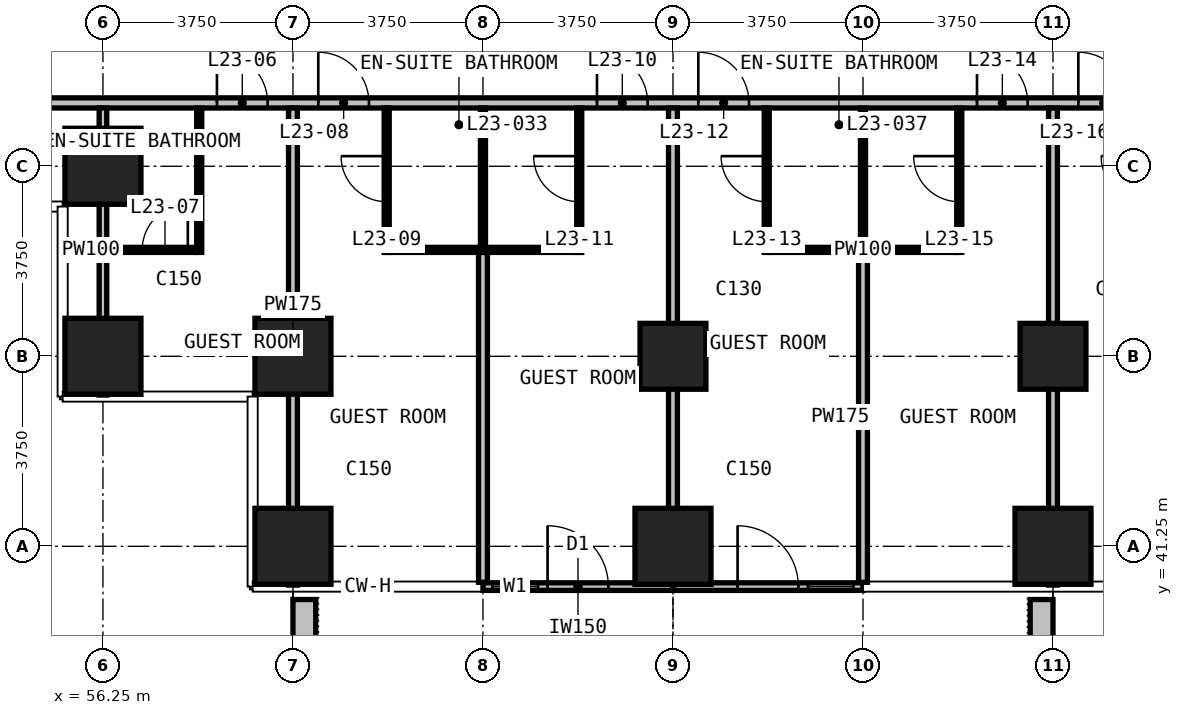
"""IFC4 building model, lengths in metres.
Left out: names, types, materials, properties, quantities, classifications, styles, units other than length and angle.
Written with IfcOpenShell. Run it as: python <this file> out.ifc"""

import sys

from ifc_helpers import new_model, si_unit, direction, frame, frame_2d, origin, origin_2d, place, context, subcontext, project, spatial, rectangle, extrude, element, fill, save


model = new_model("IFC4")
c1 = context("Model", 3, precision=1e-05, world=origin(), true_north=direction((0.0, 1.0)))
c2 = subcontext(c1, "Body", "Model", "MODEL_VIEW")
j1 = project(units=[si_unit("LENGTHUNIT", "METRE"), si_unit("PLANEANGLEUNIT", "RADIAN")], contexts=[c1])
p1 = place(None, origin())
s1 = spatial("IfcSite", under=j1, at=p1, CompositionType="ELEMENT")
p2 = place(p1, origin())
s2 = spatial("IfcBuilding", under=s1, at=p2, CompositionType="ELEMENT")
p3 = place(p2, frame((0.0, 0.0, 95.6)))
s3 = spatial("IfcBuildingStorey", under=s2, at=p3, CompositionType="ELEMENT", Elevation=95.6)
for number, where, z_axis, x_axis in (
    (1, (56.25, 45.0, 0.0), (0.0, 0.0, 1.0), (1.0, 0.0, 0.0)),
    (2, (56.25, 48.75, 0.0), (0.0, 0.0, 1.0), (1.0, 0.0, 0.0)),
    (3, (60.0, 41.25, 0.0), (0.0, 0.0, 1.0), (1.0, 0.0, 0.0)),
    (4, (60.0, 45.0, 0.0), (0.0, 0.0, 1.0), (1.0, 0.0, 0.0)),
    (5, (67.5, 41.25, 0.0), (0.0, 0.0, 1.0), (1.0, 0.0, 0.0)),
):
    element("IfcColumn", number, at=place(p3, frame(where, z_axis=z_axis, x_axis=x_axis)), inside=s3, PredefinedType="COLUMN", context=c2, shape_type="SweptSolid", body=[
        extrude(rectangle(XDim=1.5, YDim=1.5, at=origin_2d()), origin(), (0.0, 0.0, 1.0), 3.3),
    ])
p4 = place(p3, frame((67.5, 45.0, 0.0), z_axis=(0.0, 0.0, 1.0), x_axis=(1.0, 0.0, 0.0)))
e6 = element("IfcColumn", 6, at=p4, inside=s3, PredefinedType="COLUMN", context=c2, shape_type="SweptSolid", body=[
    extrude(rectangle(XDim=1.3, YDim=1.3, at=origin_2d()), origin(), (0.0, 0.0, 1.0), 3.3),
])
p5 = place(p3, frame((75.0, 41.25, 0.0), z_axis=(0.0, 0.0, 1.0), x_axis=(1.0, 0.0, 0.0)))
e7 = element("IfcColumn", 7, at=p5, inside=s3, PredefinedType="COLUMN", context=c2, shape_type="SweptSolid", body=[
    extrude(rectangle(XDim=1.5, YDim=1.5, at=origin_2d()), origin(), (0.0, 0.0, 1.0), 3.3),
])
p6 = place(p3, frame((75.0, 45.0, 0.0), z_axis=(0.0, 0.0, 1.0), x_axis=(1.0, 0.0, 0.0)))
e8 = element("IfcColumn", 8, at=p6, inside=s3, PredefinedType="COLUMN", context=c2, shape_type="SweptSolid", body=[
    extrude(rectangle(XDim=1.3, YDim=1.3, at=origin_2d()), origin(), (0.0, 0.0, 1.0), 3.3),
])
p7 = place(p3, frame((63.75, 40.455, 0.0), z_axis=(0.0, 0.0, 1.0), x_axis=(1.0, 0.0, 0.0)))
e9 = element("IfcWall", 9, at=p7, inside=s3, PredefinedType="SOLIDWALL", context=c2, shape_type="SweptSolid", body=[
    extrude(rectangle(XDim=3.75, YDim=0.15, at=frame_2d((1.875, 0.0))), origin(), (0.0, 0.0, 1.0), 3.0),
])
p8 = place(p7, frame((0.188, 0.0, 0.1)))
e10 = element("IfcOpeningElement", 10, at=p8, cuts=e9, PredefinedType="OPENING", context=c2, shape_type="SweptSolid", body=[
    extrude(rectangle(XDim=0.9, YDim=2.4, at=frame_2d((0.45, 1.2))), frame((0.0, 0.085, 0.0), z_axis=(0.0, -1.0, 0.0), x_axis=(1.0, 0.0, 0.0)), (0.0, 0.0, 1.0), 0.17),
])
p9 = place(p7, frame((1.275, 0.0, 0.0)))
e11 = element("IfcOpeningElement", 11, at=p9, cuts=e9, PredefinedType="OPENING", context=c2, shape_type="SweptSolid", body=[
    extrude(rectangle(XDim=1.2, YDim=2.4, at=frame_2d((0.6, 1.2))), frame((0.0, 0.085, 0.0), z_axis=(0.0, -1.0, 0.0), x_axis=(1.0, 0.0, 0.0)), (0.0, 0.0, 1.0), 0.17),
])
p10 = place(p3, frame((67.5, 40.455, 0.0), z_axis=(0.0, 0.0, 1.0), x_axis=(1.0, 0.0, 0.0)))
e12 = element("IfcWall", 12, at=p10, inside=s3, PredefinedType="SOLIDWALL", context=c2, shape_type="SweptSolid", body=[
    extrude(rectangle(XDim=3.75, YDim=0.15, at=frame_2d((1.875, 0.0))), origin(), (0.0, 0.0, 1.0), 3.0),
])
p11 = place(p10, frame((1.275, 0.0, 0.0)))
e13 = element("IfcOpeningElement", 13, at=p11, cuts=e12, PredefinedType="OPENING", context=c2, shape_type="SweptSolid", body=[
    extrude(rectangle(XDim=1.2, YDim=2.4, at=frame_2d((0.6, 1.2))), frame((0.0, 0.085, 0.0), z_axis=(0.0, -1.0, 0.0), x_axis=(1.0, 0.0, 0.0)), (0.0, 0.0, 1.0), 0.17),
])
p12 = place(p10, frame((2.663, 0.0, 0.1)))
e14 = element("IfcOpeningElement", 14, at=p12, cuts=e12, PredefinedType="OPENING", context=c2, shape_type="SweptSolid", body=[
    extrude(rectangle(XDim=0.9, YDim=2.4, at=frame_2d((0.45, 1.2))), frame((0.0, 0.085, 0.0), z_axis=(0.0, -1.0, 0.0), x_axis=(1.0, 0.0, 0.0)), (0.0, 0.0, 1.0), 0.17),
])
for number, where, z_axis, x_axis in (
    (15, (60.225, 40.2, 0.0), (0.0, 0.0, 1.0), (0.0, -1.0, 0.0)),
    (16, (74.775, 40.2, 0.0), (0.0, 0.0, 1.0), (0.0, -1.0, 0.0)),
):
    element("IfcWall", number, at=place(p3, frame(where, z_axis=z_axis, x_axis=x_axis)), inside=s3, PredefinedType="USERDEFINED", context=c2, shape_type="SweptSolid", body=[
        extrude(rectangle(XDim=2.35, YDim=0.45, at=frame_2d((1.175, 0.0))), origin(), (0.0, 0.0, 1.0), 1.1),
    ])
p13 = place(p3, frame((52.575, 50.0, 0.0), z_axis=(0.0, 0.0, 1.0), x_axis=(1.0, 0.0, 0.0)))
e17 = element("IfcWall", 17, at=p13, inside=s3, PredefinedType="PARTITIONING", context=c2, shape_type="SweptSolid", body=[
    extrude(rectangle(XDim=44.85, YDim=0.2, at=frame_2d((22.425, 0.0))), origin(), (0.0, 0.0, 1.0), 3.0),
])
p14 = place(p13, frame((5.925, 0.0, 0.0)))
e18 = element("IfcOpeningElement", 18, at=p14, cuts=e17, PredefinedType="OPENING", context=c2, shape_type="SweptSolid", body=[
    extrude(rectangle(XDim=1.0, YDim=2.2, at=frame_2d((0.5, 1.1))), frame((0.0, 0.11, 0.0), z_axis=(0.0, -1.0, 0.0), x_axis=(1.0, 0.0, 0.0)), (0.0, 0.0, 1.0), 0.22),
])
p15 = place(p13, frame((7.925, 0.0, 0.0)))
e19 = element("IfcOpeningElement", 19, at=p15, cuts=e17, PredefinedType="OPENING", context=c2, shape_type="SweptSolid", body=[
    extrude(rectangle(XDim=1.0, YDim=2.2, at=frame_2d((0.5, 1.1))), frame((0.0, 0.11, 0.0), z_axis=(0.0, -1.0, 0.0), x_axis=(1.0, 0.0, 0.0)), (0.0, 0.0, 1.0), 0.22),
])
p16 = place(p13, frame((13.425, 0.0, 0.0)))
e20 = element("IfcOpeningElement", 20, at=p16, cuts=e17, PredefinedType="OPENING", context=c2, shape_type="SweptSolid", body=[
    extrude(rectangle(XDim=1.0, YDim=2.2, at=frame_2d((0.5, 1.1))), frame((0.0, 0.11, 0.0), z_axis=(0.0, -1.0, 0.0), x_axis=(1.0, 0.0, 0.0)), (0.0, 0.0, 1.0), 0.22),
])
p17 = place(p13, frame((15.425, 0.0, 0.0)))
e21 = element("IfcOpeningElement", 21, at=p17, cuts=e17, PredefinedType="OPENING", context=c2, shape_type="SweptSolid", body=[
    extrude(rectangle(XDim=1.0, YDim=2.2, at=frame_2d((0.5, 1.1))), frame((0.0, 0.11, 0.0), z_axis=(0.0, -1.0, 0.0), x_axis=(1.0, 0.0, 0.0)), (0.0, 0.0, 1.0), 0.22),
])
p18 = place(p13, frame((20.925, 0.0, 0.0)))
e22 = element("IfcOpeningElement", 22, at=p18, cuts=e17, PredefinedType="OPENING", context=c2, shape_type="SweptSolid", body=[
    extrude(rectangle(XDim=1.0, YDim=2.2, at=frame_2d((0.5, 1.1))), frame((0.0, 0.11, 0.0), z_axis=(0.0, -1.0, 0.0), x_axis=(1.0, 0.0, 0.0)), (0.0, 0.0, 1.0), 0.22),
])
p19 = place(p13, frame((22.925, 0.0, 0.0)))
e23 = element("IfcOpeningElement", 23, at=p19, cuts=e17, PredefinedType="OPENING", context=c2, shape_type="SweptSolid", body=[
    extrude(rectangle(XDim=1.0, YDim=2.2, at=frame_2d((0.5, 1.1))), frame((0.0, 0.11, 0.0), z_axis=(0.0, -1.0, 0.0), x_axis=(1.0, 0.0, 0.0)), (0.0, 0.0, 1.0), 0.22),
])
p20 = place(p13, frame((28.425, 0.0, 0.0)))
e24 = element("IfcOpeningElement", 24, at=p20, cuts=e17, PredefinedType="OPENING", context=c2, shape_type="SweptSolid", body=[
    extrude(rectangle(XDim=1.0, YDim=2.2, at=frame_2d((0.5, 1.1))), frame((0.0, 0.11, 0.0), z_axis=(0.0, -1.0, 0.0), x_axis=(1.0, 0.0, 0.0)), (0.0, 0.0, 1.0), 0.22),
])
p21 = place(p13, frame((30.425, 0.0, 0.0)))
e25 = element("IfcOpeningElement", 25, at=p21, cuts=e17, PredefinedType="OPENING", context=c2, shape_type="SweptSolid", body=[
    extrude(rectangle(XDim=1.0, YDim=2.2, at=frame_2d((0.5, 1.1))), frame((0.0, 0.11, 0.0), z_axis=(0.0, -1.0, 0.0), x_axis=(1.0, 0.0, 0.0)), (0.0, 0.0, 1.0), 0.22),
])
p22 = place(p13, frame((35.925, 0.0, 0.0)))
e26 = element("IfcOpeningElement", 26, at=p22, cuts=e17, PredefinedType="OPENING", context=c2, shape_type="SweptSolid", body=[
    extrude(rectangle(XDim=1.0, YDim=2.2, at=frame_2d((0.5, 1.1))), frame((0.0, 0.11, 0.0), z_axis=(0.0, -1.0, 0.0), x_axis=(1.0, 0.0, 0.0)), (0.0, 0.0, 1.0), 0.22),
])
p23 = place(p13, frame((37.925, 0.0, 0.0)))
e27 = element("IfcOpeningElement", 27, at=p23, cuts=e17, PredefinedType="OPENING", context=c2, shape_type="SweptSolid", body=[
    extrude(rectangle(XDim=1.0, YDim=2.2, at=frame_2d((0.5, 1.1))), frame((0.0, 0.11, 0.0), z_axis=(0.0, -1.0, 0.0), x_axis=(1.0, 0.0, 0.0)), (0.0, 0.0, 1.0), 0.22),
])
p24 = place(p13, frame((1.4, 0.0, 0.0)))
e28 = element("IfcOpeningElement", 28, at=p24, cuts=e17, PredefinedType="OPENING", context=c2, shape_type="SweptSolid", body=[
    extrude(rectangle(XDim=0.9, YDim=2.2, at=frame_2d((0.45, 1.1))), frame((0.0, 0.11, 0.0), z_axis=(0.0, -1.0, 0.0), x_axis=(1.0, 0.0, 0.0)), (0.0, 0.0, 1.0), 0.22),
])
p25 = place(p13, frame((42.575, 0.0, 0.0)))
e29 = element("IfcOpeningElement", 29, at=p25, cuts=e17, PredefinedType="OPENING", context=c2, shape_type="SweptSolid", body=[
    extrude(rectangle(XDim=0.9, YDim=2.2, at=frame_2d((0.45, 1.1))), frame((0.0, 0.11, 0.0), z_axis=(0.0, -1.0, 0.0), x_axis=(1.0, 0.0, 0.0)), (0.0, 0.0, 1.0), 0.22),
])
p26 = place(p3, frame((60.0, 40.485, 0.0), z_axis=(0.0, 0.0, 1.0), x_axis=(0.0, 1.0, 0.0)))
e30 = element("IfcWall", 30, at=p26, inside=s3, PredefinedType="PARTITIONING", context=c2, shape_type="SweptSolid", body=[
    extrude(rectangle(XDim=9.415, YDim=0.175, at=frame_2d((4.708, 0.0))), origin(), (0.0, 0.0, 1.0), 3.0),
])
p27 = place(p3, frame((63.75, 40.54, 0.0), z_axis=(0.0, 0.0, 1.0), x_axis=(0.0, 1.0, 0.0)))
e31 = element("IfcWall", 31, at=p27, inside=s3, PredefinedType="PARTITIONING", context=c2, shape_type="SweptSolid", body=[
    extrude(rectangle(XDim=6.51, YDim=0.175, at=frame_2d((3.255, 0.0))), origin(), (0.0, 0.0, 1.0), 3.0),
])
p28 = place(p3, frame((67.5, 40.54, 0.0), z_axis=(0.0, 0.0, 1.0), x_axis=(0.0, 1.0, 0.0)))
e32 = element("IfcWall", 32, at=p28, inside=s3, PredefinedType="PARTITIONING", context=c2, shape_type="SweptSolid", body=[
    extrude(rectangle(XDim=9.36, YDim=0.175, at=frame_2d((4.68, 0.0))), origin(), (0.0, 0.0, 1.0), 3.0),
])
p29 = place(p3, frame((71.25, 40.54, 0.0), z_axis=(0.0, 0.0, 1.0), x_axis=(0.0, 1.0, 0.0)))
e33 = element("IfcWall", 33, at=p29, inside=s3, PredefinedType="PARTITIONING", context=c2, shape_type="SweptSolid", body=[
    extrude(rectangle(XDim=6.51, YDim=0.175, at=frame_2d((3.255, 0.0))), origin(), (0.0, 0.0, 1.0), 3.0),
])
p30 = place(p3, frame((75.0, 40.485, 0.0), z_axis=(0.0, 0.0, 1.0), x_axis=(0.0, 1.0, 0.0)))
e34 = element("IfcWall", 34, at=p30, inside=s3, PredefinedType="PARTITIONING", context=c2, shape_type="SweptSolid", body=[
    extrude(rectangle(XDim=9.415, YDim=0.175, at=frame_2d((4.708, 0.0))), origin(), (0.0, 0.0, 1.0), 3.0),
])
p31 = place(p3, frame((56.25, 44.235, 0.0), z_axis=(0.0, 0.0, 1.0), x_axis=(0.0, 1.0, 0.0)))
e35 = element("IfcWall", 35, at=p31, inside=s3, PredefinedType="PARTITIONING", context=c2, shape_type="SweptSolid", body=[
    extrude(rectangle(XDim=5.665, YDim=0.15, at=frame_2d((2.833, 0.0))), origin(), (0.0, 0.0, 1.0), 3.0),
])
p32 = place(p3, frame((56.325, 47.1, 0.0), z_axis=(0.0, 0.0, 1.0), x_axis=(1.0, 0.0, 0.0)))
e36 = element("IfcWall", 36, at=p32, inside=s3, PredefinedType="PARTITIONING", context=c2, shape_type="SweptSolid", body=[
    extrude(rectangle(XDim=1.775, YDim=0.1, at=frame_2d((0.888, 0.0))), origin(), (0.0, 0.0, 1.0), 3.0),
])
p33 = place(p32, frame((0.7, 0.0, 0.0)))
e37 = element("IfcOpeningElement", 37, at=p33, cuts=e36, PredefinedType="OPENING", context=c2, shape_type="SweptSolid", body=[
    extrude(rectangle(XDim=0.9, YDim=2.2, at=frame_2d((0.45, 1.1))), frame((0.0, 0.06, 0.0), z_axis=(0.0, -1.0, 0.0), x_axis=(1.0, 0.0, 0.0)), (0.0, 0.0, 1.0), 0.12),
])
for number, where, z_axis, x_axis in (
    (38, (61.9, 47.1, 0.0), (0.0, 0.0, 1.0), (1.0, 0.0, 0.0)),
    (39, (69.4, 47.1, 0.0), (0.0, 0.0, 1.0), (1.0, 0.0, 0.0)),
):
    element("IfcWall", number, at=place(p3, frame(where, z_axis=z_axis, x_axis=x_axis)), inside=s3, PredefinedType="PARTITIONING", context=c2, shape_type="SweptSolid", body=[
        extrude(rectangle(XDim=3.7, YDim=0.1, at=frame_2d((1.85, 0.0))), origin(), (0.0, 0.0, 1.0), 3.0),
    ])
p34 = place(p3, frame((58.15, 47.05, 0.0), z_axis=(0.0, 0.0, 1.0), x_axis=(0.0, 1.0, 0.0)))
e40 = element("IfcWall", 40, at=p34, inside=s3, PredefinedType="PARTITIONING", context=c2, shape_type="SweptSolid", body=[
    extrude(rectangle(XDim=2.85, YDim=0.1, at=frame_2d((1.425, 0.0))), origin(), (0.0, 0.0, 1.0), 3.0),
])
p35 = place(p3, frame((61.85, 47.05, 0.0), z_axis=(0.0, 0.0, 1.0), x_axis=(0.0, 1.0, 0.0)))
e41 = element("IfcWall", 41, at=p35, inside=s3, PredefinedType="PARTITIONING", context=c2, shape_type="SweptSolid", body=[
    extrude(rectangle(XDim=2.85, YDim=0.1, at=frame_2d((1.425, 0.0))), origin(), (0.0, 0.0, 1.0), 3.0),
])
p36 = place(p35, frame((1.0, 0.0, 0.0)))
e42 = element("IfcOpeningElement", 42, at=p36, cuts=e41, PredefinedType="OPENING", context=c2, shape_type="SweptSolid", body=[
    extrude(rectangle(XDim=0.9, YDim=2.2, at=frame_2d((0.45, 1.1))), frame((0.0, 0.06, 0.0), z_axis=(0.0, -1.0, 0.0), x_axis=(1.0, 0.0, 0.0)), (0.0, 0.0, 1.0), 0.12),
])
p37 = place(p3, frame((63.75, 47.15, 0.0), z_axis=(0.0, 0.0, 1.0), x_axis=(0.0, 1.0, 0.0)))
e43 = element("IfcWall", 43, at=p37, inside=s3, PredefinedType="PARTITIONING", context=c2, shape_type="SweptSolid", body=[
    extrude(rectangle(XDim=2.75, YDim=0.1, at=frame_2d((1.375, 0.0))), origin(), (0.0, 0.0, 1.0), 3.0),
])
p38 = place(p3, frame((65.65, 47.05, 0.0), z_axis=(0.0, 0.0, 1.0), x_axis=(0.0, 1.0, 0.0)))
e44 = element("IfcWall", 44, at=p38, inside=s3, PredefinedType="PARTITIONING", context=c2, shape_type="SweptSolid", body=[
    extrude(rectangle(XDim=2.85, YDim=0.1, at=frame_2d((1.425, 0.0))), origin(), (0.0, 0.0, 1.0), 3.0),
])
p39 = place(p38, frame((1.0, 0.0, 0.0)))
e45 = element("IfcOpeningElement", 45, at=p39, cuts=e44, PredefinedType="OPENING", context=c2, shape_type="SweptSolid", body=[
    extrude(rectangle(XDim=0.9, YDim=2.2, at=frame_2d((0.45, 1.1))), frame((0.0, 0.06, 0.0), z_axis=(0.0, -1.0, 0.0), x_axis=(1.0, 0.0, 0.0)), (0.0, 0.0, 1.0), 0.12),
])
p40 = place(p3, frame((69.35, 47.05, 0.0), z_axis=(0.0, 0.0, 1.0), x_axis=(0.0, 1.0, 0.0)))
e46 = element("IfcWall", 46, at=p40, inside=s3, PredefinedType="PARTITIONING", context=c2, shape_type="SweptSolid", body=[
    extrude(rectangle(XDim=2.85, YDim=0.1, at=frame_2d((1.425, 0.0))), origin(), (0.0, 0.0, 1.0), 3.0),
])
p41 = place(p40, frame((1.0, 0.0, 0.0)))
e47 = element("IfcOpeningElement", 47, at=p41, cuts=e46, PredefinedType="OPENING", context=c2, shape_type="SweptSolid", body=[
    extrude(rectangle(XDim=0.9, YDim=2.2, at=frame_2d((0.45, 1.1))), frame((0.0, 0.06, 0.0), z_axis=(0.0, -1.0, 0.0), x_axis=(1.0, 0.0, 0.0)), (0.0, 0.0, 1.0), 0.12),
])
p42 = place(p3, frame((71.25, 47.15, 0.0), z_axis=(0.0, 0.0, 1.0), x_axis=(0.0, 1.0, 0.0)))
e48 = element("IfcWall", 48, at=p42, inside=s3, PredefinedType="PARTITIONING", context=c2, shape_type="SweptSolid", body=[
    extrude(rectangle(XDim=2.75, YDim=0.1, at=frame_2d((1.375, 0.0))), origin(), (0.0, 0.0, 1.0), 3.0),
])
p43 = place(p3, frame((73.15, 47.05, 0.0), z_axis=(0.0, 0.0, 1.0), x_axis=(0.0, 1.0, 0.0)))
e49 = element("IfcWall", 49, at=p43, inside=s3, PredefinedType="PARTITIONING", context=c2, shape_type="SweptSolid", body=[
    extrude(rectangle(XDim=2.85, YDim=0.1, at=frame_2d((1.425, 0.0))), origin(), (0.0, 0.0, 1.0), 3.0),
])
p44 = place(p43, frame((1.0, 0.0, 0.0)))
e50 = element("IfcOpeningElement", 50, at=p44, cuts=e49, PredefinedType="OPENING", context=c2, shape_type="SweptSolid", body=[
    extrude(rectangle(XDim=0.9, YDim=2.2, at=frame_2d((0.45, 1.1))), frame((0.0, 0.06, 0.0), z_axis=(0.0, -1.0, 0.0), x_axis=(1.0, 0.0, 0.0)), (0.0, 0.0, 1.0), 0.12),
])
p45 = place(p8, origin())
e51 = element("IfcWindow", 51, at=p45, inside=s3, PartitioningType="SINGLE_PANEL", PredefinedType="WINDOW", context=c2, shape_type="SweptSolid", body=[
    extrude(rectangle(XDim=0.9, YDim=2.4, at=frame_2d((0.45, 1.2))), frame((0.0, 0.03, 0.0), z_axis=(0.0, -1.0, 0.0), x_axis=(1.0, 0.0, 0.0)), (0.0, 0.0, 1.0), 0.06),
])
fill(e10, e51)
p46 = place(p9, origin())
e52 = element("IfcDoor", 52, at=p46, inside=s3, OperationType="SINGLE_SWING_LEFT", PredefinedType="DOOR", context=c2, shape_type="SweptSolid", body=[
    extrude(rectangle(XDim=1.2, YDim=2.4, at=frame_2d((0.6, 1.2))), frame((0.0, 0.025, 0.0), z_axis=(0.0, -1.0, 0.0), x_axis=(1.0, 0.0, 0.0)), (0.0, 0.0, 1.0), 0.05),
])
fill(e11, e52)
p47 = place(p11, origin())
e53 = element("IfcDoor", 53, at=p47, inside=s3, OperationType="SINGLE_SWING_LEFT", PredefinedType="DOOR", context=c2, shape_type="SweptSolid", body=[
    extrude(rectangle(XDim=1.2, YDim=2.4, at=frame_2d((0.6, 1.2))), frame((0.0, 0.025, 0.0), z_axis=(0.0, -1.0, 0.0), x_axis=(1.0, 0.0, 0.0)), (0.0, 0.0, 1.0), 0.05),
])
fill(e13, e53)
p48 = place(p12, origin())
e54 = element("IfcWindow", 54, at=p48, inside=s3, PartitioningType="SINGLE_PANEL", PredefinedType="WINDOW", context=c2, shape_type="SweptSolid", body=[
    extrude(rectangle(XDim=0.9, YDim=2.4, at=frame_2d((0.45, 1.2))), frame((0.0, 0.03, 0.0), z_axis=(0.0, -1.0, 0.0), x_axis=(1.0, 0.0, 0.0)), (0.0, 0.0, 1.0), 0.06),
])
fill(e14, e54)
p49 = place(p14, origin())
e55 = element("IfcDoor", 55, at=p49, inside=s3, OperationType="SINGLE_SWING_RIGHT", PredefinedType="DOOR", context=c2, shape_type="SweptSolid", body=[
    extrude(rectangle(XDim=1.0, YDim=2.2, at=frame_2d((0.5, 1.1))), frame((0.0, 0.025, 0.0), z_axis=(0.0, -1.0, 0.0), x_axis=(1.0, 0.0, 0.0)), (0.0, 0.0, 1.0), 0.05),
])
fill(e18, e55)
p50 = place(p33, origin())
e56 = element("IfcDoor", 56, at=p50, inside=s3, OperationType="SINGLE_SWING_RIGHT", PredefinedType="DOOR", context=c2, shape_type="SweptSolid", body=[
    extrude(rectangle(XDim=0.9, YDim=2.2, at=frame_2d((0.45, 1.1))), frame((0.0, 0.025, 0.0), z_axis=(0.0, -1.0, 0.0), x_axis=(1.0, 0.0, 0.0)), (0.0, 0.0, 1.0), 0.05),
])
fill(e37, e56)
p51 = place(p15, origin())
e57 = element("IfcDoor", 57, at=p51, inside=s3, OperationType="SINGLE_SWING_LEFT", PredefinedType="DOOR", context=c2, shape_type="SweptSolid", body=[
    extrude(rectangle(XDim=1.0, YDim=2.2, at=frame_2d((0.5, 1.1))), frame((0.0, 0.025, 0.0), z_axis=(0.0, -1.0, 0.0), x_axis=(1.0, 0.0, 0.0)), (0.0, 0.0, 1.0), 0.05),
])
fill(e19, e57)
p52 = place(p36, origin())
e58 = element("IfcDoor", 58, at=p52, inside=s3, OperationType="SINGLE_SWING_RIGHT", PredefinedType="DOOR", context=c2, shape_type="SweptSolid", body=[
    extrude(rectangle(XDim=0.9, YDim=2.2, at=frame_2d((0.45, 1.1))), frame((0.0, 0.025, 0.0), z_axis=(0.0, -1.0, 0.0), x_axis=(1.0, 0.0, 0.0)), (0.0, 0.0, 1.0), 0.05),
])
fill(e42, e58)
p53 = place(p16, origin())
e59 = element("IfcDoor", 59, at=p53, inside=s3, OperationType="SINGLE_SWING_LEFT", PredefinedType="DOOR", context=c2, shape_type="SweptSolid", body=[
    extrude(rectangle(XDim=1.0, YDim=2.2, at=frame_2d((0.5, 1.1))), frame((0.0, 0.025, 0.0), z_axis=(0.0, -1.0, 0.0), x_axis=(1.0, 0.0, 0.0)), (0.0, 0.0, 1.0), 0.05),
])
fill(e20, e59)
p54 = place(p39, origin())
e60 = element("IfcDoor", 60, at=p54, inside=s3, OperationType="SINGLE_SWING_RIGHT", PredefinedType="DOOR", context=c2, shape_type="SweptSolid", body=[
    extrude(rectangle(XDim=0.9, YDim=2.2, at=frame_2d((0.45, 1.1))), frame((0.0, 0.025, 0.0), z_axis=(0.0, -1.0, 0.0), x_axis=(1.0, 0.0, 0.0)), (0.0, 0.0, 1.0), 0.05),
])
fill(e45, e60)
p55 = place(p17, origin())
e61 = element("IfcDoor", 61, at=p55, inside=s3, OperationType="SINGLE_SWING_LEFT", PredefinedType="DOOR", context=c2, shape_type="SweptSolid", body=[
    extrude(rectangle(XDim=1.0, YDim=2.2, at=frame_2d((0.5, 1.1))), frame((0.0, 0.025, 0.0), z_axis=(0.0, -1.0, 0.0), x_axis=(1.0, 0.0, 0.0)), (0.0, 0.0, 1.0), 0.05),
])
fill(e21, e61)
p56 = place(p41, origin())
e62 = element("IfcDoor", 62, at=p56, inside=s3, OperationType="SINGLE_SWING_RIGHT", PredefinedType="DOOR", context=c2, shape_type="SweptSolid", body=[
    extrude(rectangle(XDim=0.9, YDim=2.2, at=frame_2d((0.45, 1.1))), frame((0.0, 0.025, 0.0), z_axis=(0.0, -1.0, 0.0), x_axis=(1.0, 0.0, 0.0)), (0.0, 0.0, 1.0), 0.05),
])
fill(e47, e62)
p57 = place(p18, origin())
e63 = element("IfcDoor", 63, at=p57, inside=s3, OperationType="SINGLE_SWING_LEFT", PredefinedType="DOOR", context=c2, shape_type="SweptSolid", body=[
    extrude(rectangle(XDim=1.0, YDim=2.2, at=frame_2d((0.5, 1.1))), frame((0.0, 0.025, 0.0), z_axis=(0.0, -1.0, 0.0), x_axis=(1.0, 0.0, 0.0)), (0.0, 0.0, 1.0), 0.05),
])
fill(e22, e63)
p58 = place(p44, origin())
e64 = element("IfcDoor", 64, at=p58, inside=s3, OperationType="SINGLE_SWING_RIGHT", PredefinedType="DOOR", context=c2, shape_type="SweptSolid", body=[
    extrude(rectangle(XDim=0.9, YDim=2.2, at=frame_2d((0.45, 1.1))), frame((0.0, 0.025, 0.0), z_axis=(0.0, -1.0, 0.0), x_axis=(1.0, 0.0, 0.0)), (0.0, 0.0, 1.0), 0.05),
])
fill(e50, e64)
p59 = place(p19, origin())
e65 = element("IfcDoor", 65, at=p59, inside=s3, OperationType="SINGLE_SWING_RIGHT", PredefinedType="DOOR", context=c2, shape_type="SweptSolid", body=[
    extrude(rectangle(XDim=1.0, YDim=2.2, at=frame_2d((0.5, 1.1))), frame((0.0, 0.025, 0.0), z_axis=(0.0, -1.0, 0.0), x_axis=(1.0, 0.0, 0.0)), (0.0, 0.0, 1.0), 0.05),
])
fill(e23, e65)
save(model, sys.argv[1])
